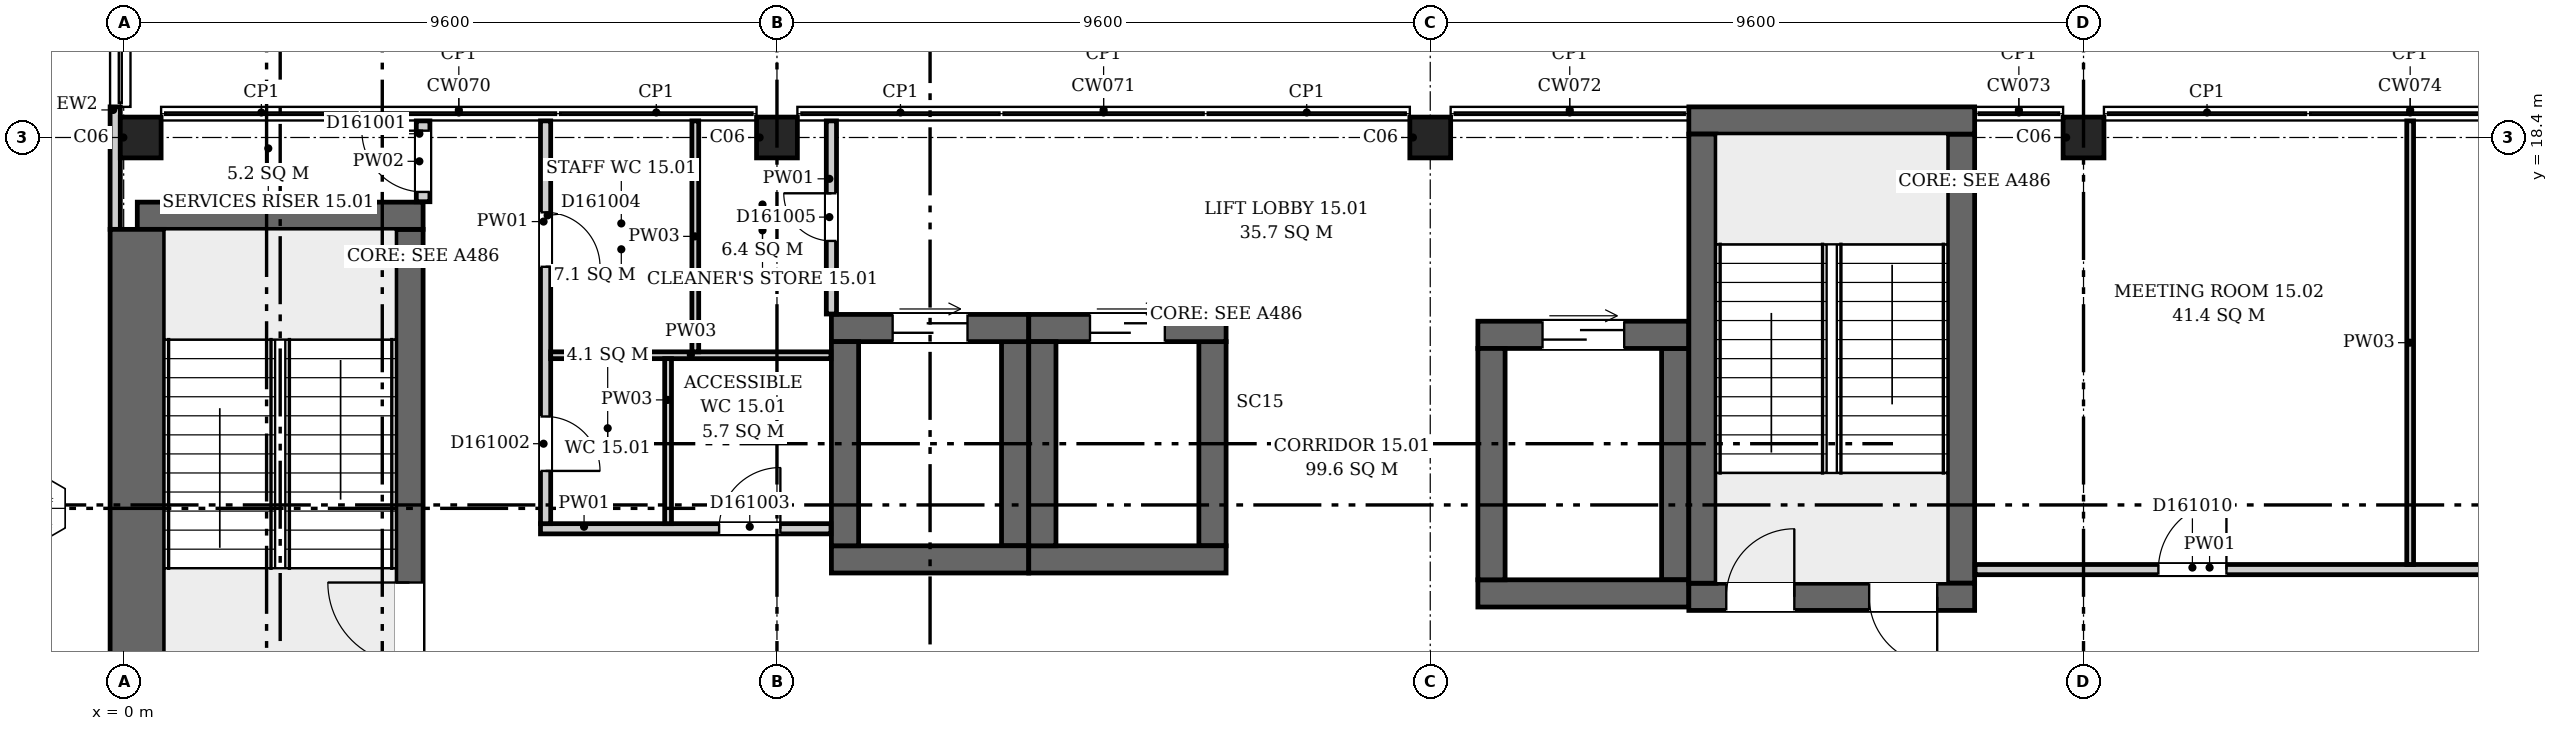
"""IFC4 building model, lengths in metres.
Left out: names, types, materials, properties, quantities, classifications, styles, units other than length and angle.
Written with IfcOpenShell. Run it as: python <this file> out.ifc"""

import sys

from ifc_helpers import new_model, si_unit, direction, frame, frame_2d, origin, origin_2d, place, context, subcontext, project, spatial, rectangle, extrude, element, fill, save


model = new_model("IFC4")
c1 = context("Model", 3, precision=1e-05, world=origin(), true_north=direction((0.0, 1.0)))
c2 = subcontext(c1, "Body", "Model", "MODEL_VIEW")
j1 = project(units=[si_unit("LENGTHUNIT", "METRE"), si_unit("PLANEANGLEUNIT", "RADIAN")], contexts=[c1])
p1 = place(None, origin())
s1 = spatial("IfcSite", under=j1, at=p1, CompositionType="ELEMENT")
p2 = place(p1, origin())
s2 = spatial("IfcBuilding", under=s1, at=p2, CompositionType="ELEMENT")
p3 = place(p2, frame((0.0, 0.0, 73.9)))
s3 = spatial("IfcBuildingStorey", under=s2, at=p3, CompositionType="ELEMENT", Elevation=73.9)
p4 = place(p3, frame((0.2, 17.25, 0.0), z_axis=(0.0, 0.0, 1.0), x_axis=(1.0, 0.0, 0.0)))
e1 = element("IfcWall", 1, at=p4, inside=s3, PredefinedType="SHEAR", context=c2, shape_type="SweptSolid", body=[
    extrude(rectangle(XDim=4.2, YDim=0.4, at=frame_2d((2.1, 0.0))), origin(), (0.0, 0.0, 1.0), 4.2),
])
p5 = place(p3, frame((0.2, 10.45, 0.0), z_axis=(0.0, 0.0, 1.0), x_axis=(0.0, 1.0, 0.0)))
e2 = element("IfcWall", 2, at=p5, inside=s3, PredefinedType="SHEAR", context=c2, shape_type="SweptSolid", body=[
    extrude(rectangle(XDim=6.6, YDim=0.8, at=frame_2d((3.3, 0.0))), origin(), (0.0, 0.0, 1.0), 4.2),
])
p6 = place(p3, frame((4.2, 10.45, 0.0), z_axis=(0.0, 0.0, 1.0), x_axis=(0.0, 1.0, 0.0)))
e3 = element("IfcWall", 3, at=p6, inside=s3, PredefinedType="SHEAR", context=c2, shape_type="SweptSolid", body=[
    extrude(rectangle(XDim=6.6, YDim=0.4, at=frame_2d((3.3, 0.0))), origin(), (0.0, 0.0, 1.0), 4.2),
])
p7 = place(p6, frame((0.21, 0.0, 0.0)))
e4 = element("IfcOpeningElement", 4, at=p7, cuts=e3, PredefinedType="OPENING", context=c2, shape_type="SweptSolid", body=[
    extrude(rectangle(XDim=1.2, YDim=2.1, at=frame_2d((0.6, 1.05))), frame((0.0, 0.21, 0.0), z_axis=(0.0, -1.0, 0.0), x_axis=(1.0, 0.0, 0.0)), (0.0, 0.0, 1.0), 0.42),
])
p8 = place(p3, frame((23.0, 11.65, 0.0), z_axis=(0.0, 0.0, 1.0), x_axis=(1.0, 0.0, 0.0)))
e5 = element("IfcWall", 5, at=p8, inside=s3, PredefinedType="SHEAR", context=c2, shape_type="SweptSolid", body=[
    extrude(rectangle(XDim=4.2, YDim=0.4, at=frame_2d((2.1, 0.0))), origin(), (0.0, 0.0, 1.0), 4.2),
])
p9 = place(p8, frame((0.55, 0.0, 0.0)))
e6 = element("IfcOpeningElement", 6, at=p9, cuts=e5, PredefinedType="OPENING", context=c2, shape_type="SweptSolid", body=[
    extrude(rectangle(XDim=1.0, YDim=2.1, at=frame_2d((0.5, 1.05))), frame((0.0, 0.21, 0.0), z_axis=(0.0, -1.0, 0.0), x_axis=(1.0, 0.0, 0.0)), (0.0, 0.0, 1.0), 0.42),
])
p10 = place(p8, frame((2.65, 0.0, 0.0)))
e7 = element("IfcOpeningElement", 7, at=p10, cuts=e5, PredefinedType="OPENING", context=c2, shape_type="SweptSolid", body=[
    extrude(rectangle(XDim=1.0, YDim=2.1, at=frame_2d((0.5, 1.05))), frame((0.0, 0.21, 0.0), z_axis=(0.0, -1.0, 0.0), x_axis=(1.0, 0.0, 0.0)), (0.0, 0.0, 1.0), 0.42),
])
p11 = place(p3, frame((23.0, 18.65, 0.0), z_axis=(0.0, 0.0, 1.0), x_axis=(1.0, 0.0, 0.0)))
e8 = element("IfcWall", 8, at=p11, inside=s3, PredefinedType="SHEAR", context=c2, shape_type="SweptSolid", body=[
    extrude(rectangle(XDim=4.2, YDim=0.4, at=frame_2d((2.1, 0.0))), origin(), (0.0, 0.0, 1.0), 4.2),
])
for number, where, z_axis, x_axis in (
    (9, (23.2, 11.85, 0.0), (0.0, 0.0, 1.0), (0.0, 1.0, 0.0)),
    (10, (27.0, 11.85, 0.0), (0.0, 0.0, 1.0), (0.0, 1.0, 0.0)),
):
    element("IfcWall", number, at=place(p3, frame(where, z_axis=z_axis, x_axis=x_axis)), inside=s3, PredefinedType="SHEAR", context=c2, shape_type="SweptSolid", body=[
        extrude(rectangle(XDim=6.6, YDim=0.4, at=frame_2d((3.3, 0.0))), origin(), (0.0, 0.0, 1.0), 4.2),
    ])
p12 = place(p3, frame((10.4, 12.2, 0.0), z_axis=(0.0, 0.0, 1.0), x_axis=(1.0, 0.0, 0.0)))
e11 = element("IfcWall", 11, at=p12, inside=s3, PredefinedType="SHEAR", context=c2, shape_type="SweptSolid", body=[
    extrude(rectangle(XDim=2.9, YDim=0.4, at=frame_2d((1.45, 0.0))), origin(), (0.0, 0.0, 1.0), 4.2),
])
p13 = place(p3, frame((10.4, 15.6, 0.0), z_axis=(0.0, 0.0, 1.0), x_axis=(1.0, 0.0, 0.0)))
e12 = element("IfcWall", 12, at=p13, inside=s3, PredefinedType="SHEAR", context=c2, shape_type="SweptSolid", body=[
    extrude(rectangle(XDim=2.9, YDim=0.4, at=frame_2d((1.45, 0.0))), origin(), (0.0, 0.0, 1.0), 4.2),
])
p14 = place(p13, frame((0.9, 0.0, 0.0)))
e13 = element("IfcOpeningElement", 13, at=p14, cuts=e12, PredefinedType="OPENING", context=c2, shape_type="SweptSolid", body=[
    extrude(rectangle(XDim=1.1, YDim=2.1, at=frame_2d((0.55, 1.05))), frame((0.0, 0.21, 0.0), z_axis=(0.0, -1.0, 0.0), x_axis=(1.0, 0.0, 0.0)), (0.0, 0.0, 1.0), 0.42),
])
for number, where, z_axis, x_axis in (
    (14, (10.6, 12.4, 0.0), (0.0, 0.0, 1.0), (0.0, 1.0, 0.0)),
    (15, (13.1, 12.4, 0.0), (0.0, 0.0, 1.0), (0.0, 1.0, 0.0)),
):
    element("IfcWall", number, at=place(p3, frame(where, z_axis=z_axis, x_axis=x_axis)), inside=s3, PredefinedType="SHEAR", context=c2, shape_type="SweptSolid", body=[
        extrude(rectangle(XDim=3.0, YDim=0.4, at=frame_2d((1.5, 0.0))), origin(), (0.0, 0.0, 1.0), 4.2),
    ])
p15 = place(p3, frame((13.3, 12.2, 0.0), z_axis=(0.0, 0.0, 1.0), x_axis=(1.0, 0.0, 0.0)))
e16 = element("IfcWall", 16, at=p15, inside=s3, PredefinedType="SHEAR", context=c2, shape_type="SweptSolid", body=[
    extrude(rectangle(XDim=2.9, YDim=0.4, at=frame_2d((1.45, 0.0))), origin(), (0.0, 0.0, 1.0), 4.2),
])
p16 = place(p3, frame((13.3, 15.6, 0.0), z_axis=(0.0, 0.0, 1.0), x_axis=(1.0, 0.0, 0.0)))
e17 = element("IfcWall", 17, at=p16, inside=s3, PredefinedType="SHEAR", context=c2, shape_type="SweptSolid", body=[
    extrude(rectangle(XDim=2.9, YDim=0.4, at=frame_2d((1.45, 0.0))), origin(), (0.0, 0.0, 1.0), 4.2),
])
p17 = place(p16, frame((0.9, 0.0, 0.0)))
e18 = element("IfcOpeningElement", 18, at=p17, cuts=e17, PredefinedType="OPENING", context=c2, shape_type="SweptSolid", body=[
    extrude(rectangle(XDim=1.1, YDim=2.1, at=frame_2d((0.55, 1.05))), frame((0.0, 0.21, 0.0), z_axis=(0.0, -1.0, 0.0), x_axis=(1.0, 0.0, 0.0)), (0.0, 0.0, 1.0), 0.42),
])
for number, where, z_axis, x_axis in (
    (19, (13.5, 12.4, 0.0), (0.0, 0.0, 1.0), (0.0, 1.0, 0.0)),
    (20, (16.0, 12.4, 0.0), (0.0, 0.0, 1.0), (0.0, 1.0, 0.0)),
):
    element("IfcWall", number, at=place(p3, frame(where, z_axis=z_axis, x_axis=x_axis)), inside=s3, PredefinedType="SHEAR", context=c2, shape_type="SweptSolid", body=[
        extrude(rectangle(XDim=3.0, YDim=0.4, at=frame_2d((1.5, 0.0))), origin(), (0.0, 0.0, 1.0), 4.2),
    ])
p18 = place(p3, frame((19.9, 11.7, 0.0), z_axis=(0.0, 0.0, 1.0), x_axis=(1.0, 0.0, 0.0)))
e21 = element("IfcWall", 21, at=p18, inside=s3, PredefinedType="SHEAR", context=c2, shape_type="SweptSolid", body=[
    extrude(rectangle(XDim=3.1, YDim=0.4, at=frame_2d((1.55, 0.0))), origin(), (0.0, 0.0, 1.0), 4.2),
])
p19 = place(p3, frame((19.9, 15.5, 0.0), z_axis=(0.0, 0.0, 1.0), x_axis=(1.0, 0.0, 0.0)))
e22 = element("IfcWall", 22, at=p19, inside=s3, PredefinedType="SHEAR", context=c2, shape_type="SweptSolid", body=[
    extrude(rectangle(XDim=3.1, YDim=0.4, at=frame_2d((1.55, 0.0))), origin(), (0.0, 0.0, 1.0), 4.2),
])
p20 = place(p19, frame((0.95, 0.0, 0.0)))
e23 = element("IfcOpeningElement", 23, at=p20, cuts=e22, PredefinedType="OPENING", context=c2, shape_type="SweptSolid", body=[
    extrude(rectangle(XDim=1.2, YDim=2.1, at=frame_2d((0.6, 1.05))), frame((0.0, 0.21, 0.0), z_axis=(0.0, -1.0, 0.0), x_axis=(1.0, 0.0, 0.0)), (0.0, 0.0, 1.0), 0.42),
])
for number, where, z_axis, x_axis in (
    (24, (20.1, 11.9, 0.0), (0.0, 0.0, 1.0), (0.0, 1.0, 0.0)),
    (25, (22.8, 11.9, 0.0), (0.0, 0.0, 1.0), (0.0, 1.0, 0.0)),
):
    element("IfcWall", number, at=place(p3, frame(where, z_axis=z_axis, x_axis=x_axis)), inside=s3, PredefinedType="SHEAR", context=c2, shape_type="SweptSolid", body=[
        extrude(rectangle(XDim=3.4, YDim=0.4, at=frame_2d((1.7, 0.0))), origin(), (0.0, 0.0, 1.0), 4.2),
    ])
for number, where, z_axis, x_axis in (
    (26, (0.25, 18.4, 0.0), (0.0, 0.0, 1.0), (1.0, 0.0, 0.0)),
    (27, (9.6, 18.4, 0.0), (0.0, 0.0, 1.0), (1.0, 0.0, 0.0)),
    (28, (19.2, 18.4, 0.0), (0.0, 0.0, 1.0), (1.0, 0.0, 0.0)),
    (29, (28.8, 18.4, 0.0), (0.0, 0.0, 1.0), (1.0, 0.0, 0.0)),
):
    element("IfcColumn", number, at=place(p3, frame(where, z_axis=z_axis, x_axis=x_axis)), inside=s3, PredefinedType="COLUMN", context=c2, shape_type="SweptSolid", body=[
        extrude(rectangle(XDim=0.6, YDim=0.6, at=origin_2d()), origin(), (0.0, 0.0, 1.0), 4.2),
    ])
p21 = place(p3, frame((-0.125, 18.85, 0.0), z_axis=(0.0, 0.0, 1.0), x_axis=(0.0, -1.0, 0.0)))
e30 = element("IfcWall", 30, at=p21, inside=s3, PredefinedType="ELEMENTEDWALL", context=c2, shape_type="SweptSolid", body=[
    extrude(rectangle(XDim=1.8, YDim=0.15, at=frame_2d((0.9, 0.0))), origin(), (0.0, 0.0, 1.0), 3.9),
])
p22 = place(p3, frame((4.4, 17.456, 0.0), z_axis=(0.0, 0.0, 1.0), x_axis=(0.0, 1.0, 0.0)))
e31 = element("IfcWall", 31, at=p22, inside=s3, PredefinedType="PARTITIONING", context=c2, shape_type="SweptSolid", body=[
    extrude(rectangle(XDim=1.188, YDim=0.2, at=frame_2d((0.594, 0.0))), origin(), (0.0, 0.0, 1.0), 3.9),
])
p23 = place(p22, frame((0.144, 0.0, 0.0)))
e32 = element("IfcOpeningElement", 32, at=p23, cuts=e31, PredefinedType="OPENING", context=c2, shape_type="SweptSolid", body=[
    extrude(rectangle(XDim=0.9, YDim=2.1, at=frame_2d((0.45, 1.05))), frame((0.0, 0.11, 0.0), z_axis=(0.0, -1.0, 0.0), x_axis=(1.0, 0.0, 0.0)), (0.0, 0.0, 1.0), 0.22),
])
p24 = place(p3, frame((6.125, 12.65, 0.0), z_axis=(0.0, 0.0, 1.0), x_axis=(1.0, 0.0, 0.0)))
e33 = element("IfcWall", 33, at=p24, inside=s3, PredefinedType="PARTITIONING", context=c2, shape_type="SweptSolid", body=[
    extrude(rectangle(XDim=4.269, YDim=0.15, at=frame_2d((2.135, 0.0))), origin(), (0.0, 0.0, 1.0), 3.9),
])
p25 = place(p24, frame((2.625, 0.0, 0.0)))
e34 = element("IfcOpeningElement", 34, at=p25, cuts=e33, PredefinedType="OPENING", context=c2, shape_type="SweptSolid", body=[
    extrude(rectangle(XDim=0.9, YDim=2.1, at=frame_2d((0.45, 1.05))), frame((0.0, 0.085, 0.0), z_axis=(0.0, -1.0, 0.0), x_axis=(1.0, 0.0, 0.0)), (0.0, 0.0, 1.0), 0.17),
])
p26 = place(p3, frame((6.2, 12.725, 0.0), z_axis=(0.0, 0.0, 1.0), x_axis=(0.0, 1.0, 0.0)))
e35 = element("IfcWall", 35, at=p26, inside=s3, PredefinedType="PARTITIONING", context=c2, shape_type="SweptSolid", body=[
    extrude(rectangle(XDim=5.919, YDim=0.15, at=frame_2d((2.959, 0.0))), origin(), (0.0, 0.0, 1.0), 3.9),
])
p27 = place(p26, frame((0.775, 0.0, 0.0)))
e36 = element("IfcOpeningElement", 36, at=p27, cuts=e35, PredefinedType="OPENING", context=c2, shape_type="SweptSolid", body=[
    extrude(rectangle(XDim=0.8, YDim=2.1, at=frame_2d((0.4, 1.05))), frame((0.0, 0.085, 0.0), z_axis=(0.0, -1.0, 0.0), x_axis=(1.0, 0.0, 0.0)), (0.0, 0.0, 1.0), 0.17),
])
p28 = place(p26, frame((3.775, 0.0, 0.0)))
e37 = element("IfcOpeningElement", 37, at=p28, cuts=e35, PredefinedType="OPENING", context=c2, shape_type="SweptSolid", body=[
    extrude(rectangle(XDim=0.8, YDim=2.1, at=frame_2d((0.4, 1.05))), frame((0.0, 0.085, 0.0), z_axis=(0.0, -1.0, 0.0), x_axis=(1.0, 0.0, 0.0)), (0.0, 0.0, 1.0), 0.17),
])
p29 = place(p3, frame((6.275, 15.2, 0.0), z_axis=(0.0, 0.0, 1.0), x_axis=(1.0, 0.0, 0.0)))
e38 = element("IfcWall", 38, at=p29, inside=s3, PredefinedType="PARTITIONING", context=c2, shape_type="SweptSolid", body=[
    extrude(rectangle(XDim=4.119, YDim=0.1, at=frame_2d((2.06, 0.0))), origin(), (0.0, 0.0, 1.0), 3.9),
])
p30 = place(p3, frame((8.0, 12.725, 0.0), z_axis=(0.0, 0.0, 1.0), x_axis=(0.0, 1.0, 0.0)))
e39 = element("IfcWall", 39, at=p30, inside=s3, PredefinedType="PARTITIONING", context=c2, shape_type="SweptSolid", body=[
    extrude(rectangle(XDim=2.425, YDim=0.1, at=frame_2d((1.212, 0.0))), origin(), (0.0, 0.0, 1.0), 3.9),
])
p31 = place(p3, frame((8.4, 15.25, 0.0), z_axis=(0.0, 0.0, 1.0), x_axis=(0.0, 1.0, 0.0)))
e40 = element("IfcWall", 40, at=p31, inside=s3, PredefinedType="PARTITIONING", context=c2, shape_type="SweptSolid", body=[
    extrude(rectangle(XDim=3.394, YDim=0.1, at=frame_2d((1.697, 0.0))), origin(), (0.0, 0.0, 1.0), 3.9),
])
p32 = place(p3, frame((10.4, 15.806, 0.0), z_axis=(0.0, 0.0, 1.0), x_axis=(0.0, 1.0, 0.0)))
e41 = element("IfcWall", 41, at=p32, inside=s3, PredefinedType="PARTITIONING", context=c2, shape_type="SweptSolid", body=[
    extrude(rectangle(XDim=2.838, YDim=0.15, at=frame_2d((1.419, 0.0))), origin(), (0.0, 0.0, 1.0), 3.9),
])
p33 = place(p32, frame((1.074, 0.0, 0.0)))
e42 = element("IfcOpeningElement", 42, at=p33, cuts=e41, PredefinedType="OPENING", context=c2, shape_type="SweptSolid", body=[
    extrude(rectangle(XDim=0.7, YDim=2.1, at=frame_2d((0.35, 1.05))), frame((0.0, 0.085, 0.0), z_axis=(0.0, -1.0, 0.0), x_axis=(1.0, 0.0, 0.0)), (0.0, 0.0, 1.0), 0.17),
])
p34 = place(p3, frame((27.206, 12.05, 0.0), z_axis=(0.0, 0.0, 1.0), x_axis=(1.0, 0.0, 0.0)))
e43 = element("IfcWall", 43, at=p34, inside=s3, PredefinedType="PARTITIONING", context=c2, shape_type="SweptSolid", body=[
    extrude(rectangle(XDim=11.488, YDim=0.15, at=frame_2d((5.744, 0.0))), origin(), (0.0, 0.0, 1.0), 3.9),
])
p35 = place(p34, frame((2.694, 0.0, 0.0)))
e44 = element("IfcOpeningElement", 44, at=p35, cuts=e43, PredefinedType="OPENING", context=c2, shape_type="SweptSolid", body=[
    extrude(rectangle(XDim=1.0, YDim=2.1, at=frame_2d((0.5, 1.05))), frame((0.0, 0.085, 0.0), z_axis=(0.0, -1.0, 0.0), x_axis=(1.0, 0.0, 0.0)), (0.0, 0.0, 1.0), 0.17),
])
p36 = place(p34, frame((8.444, 0.0, 0.0)))
e45 = element("IfcOpeningElement", 45, at=p36, cuts=e43, PredefinedType="OPENING", context=c2, shape_type="SweptSolid", body=[
    extrude(rectangle(XDim=1.0, YDim=2.1, at=frame_2d((0.5, 1.05))), frame((0.0, 0.085, 0.0), z_axis=(0.0, -1.0, 0.0), x_axis=(1.0, 0.0, 0.0)), (0.0, 0.0, 1.0), 0.17),
])
p37 = place(p3, frame((33.6, 12.125, 0.0), z_axis=(0.0, 0.0, 1.0), x_axis=(0.0, 1.0, 0.0)))
e46 = element("IfcWall", 46, at=p37, inside=s3, PredefinedType="PARTITIONING", context=c2, shape_type="SweptSolid", body=[
    extrude(rectangle(XDim=6.519, YDim=0.1, at=frame_2d((3.26, 0.0))), origin(), (0.0, 0.0, 1.0), 3.9),
])
p38 = place(p7, origin())
e47 = element("IfcDoor", 47, at=p38, inside=s3, OperationType="SINGLE_SWING_RIGHT", PredefinedType="DOOR", context=c2, shape_type="SweptSolid", body=[
    extrude(rectangle(XDim=1.2, YDim=2.1, at=frame_2d((0.6, 1.05))), frame((0.0, 0.025, 0.0), z_axis=(0.0, -1.0, 0.0), x_axis=(1.0, 0.0, 0.0)), (0.0, 0.0, 1.0), 0.05),
])
fill(e4, e47)
p39 = place(p9, origin())
e48 = element("IfcDoor", 48, at=p39, inside=s3, OperationType="SINGLE_SWING_RIGHT", PredefinedType="DOOR", context=c2, shape_type="SweptSolid", body=[
    extrude(rectangle(XDim=1.0, YDim=2.1, at=frame_2d((0.5, 1.05))), frame((0.0, 0.025, 0.0), z_axis=(0.0, -1.0, 0.0), x_axis=(1.0, 0.0, 0.0)), (0.0, 0.0, 1.0), 0.05),
])
fill(e6, e48)
p40 = place(p10, origin())
e49 = element("IfcDoor", 49, at=p40, inside=s3, OperationType="SINGLE_SWING_LEFT", PredefinedType="DOOR", context=c2, shape_type="SweptSolid", body=[
    extrude(rectangle(XDim=1.0, YDim=2.1, at=frame_2d((0.5, 1.05))), frame((0.0, 0.025, 0.0), z_axis=(0.0, -1.0, 0.0), x_axis=(1.0, 0.0, 0.0)), (0.0, 0.0, 1.0), 0.05),
])
fill(e7, e49)
p41 = place(p14, origin())
e50 = element("IfcDoor", 50, at=p41, inside=s3, OperationType="DOUBLE_DOOR_SLIDING", PredefinedType="DOOR", context=c2, shape_type="SweptSolid", body=[
    extrude(rectangle(XDim=1.1, YDim=2.1, at=frame_2d((0.55, 1.05))), frame((0.0, 0.025, 0.0), z_axis=(0.0, -1.0, 0.0), x_axis=(1.0, 0.0, 0.0)), (0.0, 0.0, 1.0), 0.05),
])
fill(e13, e50)
p42 = place(p17, origin())
e51 = element("IfcDoor", 51, at=p42, inside=s3, OperationType="DOUBLE_DOOR_SLIDING", PredefinedType="DOOR", context=c2, shape_type="SweptSolid", body=[
    extrude(rectangle(XDim=1.1, YDim=2.1, at=frame_2d((0.55, 1.05))), frame((0.0, 0.025, 0.0), z_axis=(0.0, -1.0, 0.0), x_axis=(1.0, 0.0, 0.0)), (0.0, 0.0, 1.0), 0.05),
])
fill(e18, e51)
p43 = place(p20, origin())
e52 = element("IfcDoor", 52, at=p43, inside=s3, OperationType="DOUBLE_DOOR_SLIDING", PredefinedType="DOOR", context=c2, shape_type="SweptSolid", body=[
    extrude(rectangle(XDim=1.2, YDim=2.1, at=frame_2d((0.6, 1.05))), frame((0.0, 0.025, 0.0), z_axis=(0.0, -1.0, 0.0), x_axis=(1.0, 0.0, 0.0)), (0.0, 0.0, 1.0), 0.05),
])
fill(e23, e52)
p44 = place(p23, origin())
e53 = element("IfcDoor", 53, at=p44, inside=s3, OperationType="SINGLE_SWING_LEFT", PredefinedType="DOOR", context=c2, shape_type="SweptSolid", body=[
    extrude(rectangle(XDim=0.9, YDim=2.1, at=frame_2d((0.45, 1.05))), frame((0.0, 0.025, 0.0), z_axis=(0.0, -1.0, 0.0), x_axis=(1.0, 0.0, 0.0)), (0.0, 0.0, 1.0), 0.05),
])
fill(e32, e53)
p45 = place(p27, origin())
e54 = element("IfcDoor", 54, at=p45, inside=s3, OperationType="SINGLE_SWING_LEFT", PredefinedType="DOOR", context=c2, shape_type="SweptSolid", body=[
    extrude(rectangle(XDim=0.8, YDim=2.1, at=frame_2d((0.4, 1.05))), frame((0.0, 0.025, 0.0), z_axis=(0.0, -1.0, 0.0), x_axis=(1.0, 0.0, 0.0)), (0.0, 0.0, 1.0), 0.05),
])
fill(e36, e54)
p46 = place(p25, origin())
e55 = element("IfcDoor", 55, at=p46, inside=s3, OperationType="SINGLE_SWING_RIGHT", PredefinedType="DOOR", context=c2, shape_type="SweptSolid", body=[
    extrude(rectangle(XDim=0.9, YDim=2.1, at=frame_2d((0.45, 1.05))), frame((0.0, 0.025, 0.0), z_axis=(0.0, -1.0, 0.0), x_axis=(1.0, 0.0, 0.0)), (0.0, 0.0, 1.0), 0.05),
])
fill(e34, e55)
p47 = place(p28, origin())
e56 = element("IfcDoor", 56, at=p47, inside=s3, OperationType="SINGLE_SWING_LEFT", PredefinedType="DOOR", context=c2, shape_type="SweptSolid", body=[
    extrude(rectangle(XDim=0.8, YDim=2.1, at=frame_2d((0.4, 1.05))), frame((0.0, 0.025, 0.0), z_axis=(0.0, -1.0, 0.0), x_axis=(1.0, 0.0, 0.0)), (0.0, 0.0, 1.0), 0.05),
])
fill(e37, e56)
p48 = place(p33, origin())
e57 = element("IfcDoor", 57, at=p48, inside=s3, OperationType="SINGLE_SWING_LEFT", PredefinedType="DOOR", context=c2, shape_type="SweptSolid", body=[
    extrude(rectangle(XDim=0.7, YDim=2.1, at=frame_2d((0.35, 1.05))), frame((0.0, 0.025, 0.0), z_axis=(0.0, -1.0, 0.0), x_axis=(1.0, 0.0, 0.0)), (0.0, 0.0, 1.0), 0.05),
])
fill(e42, e57)
p49 = place(p35, origin())
e58 = element("IfcDoor", 58, at=p49, inside=s3, OperationType="SINGLE_SWING_LEFT", PredefinedType="DOOR", context=c2, shape_type="SweptSolid", body=[
    extrude(rectangle(XDim=1.0, YDim=2.1, at=frame_2d((0.5, 1.05))), frame((0.0, 0.025, 0.0), z_axis=(0.0, -1.0, 0.0), x_axis=(1.0, 0.0, 0.0)), (0.0, 0.0, 1.0), 0.05),
])
fill(e44, e58)
save(model, sys.argv[1])
